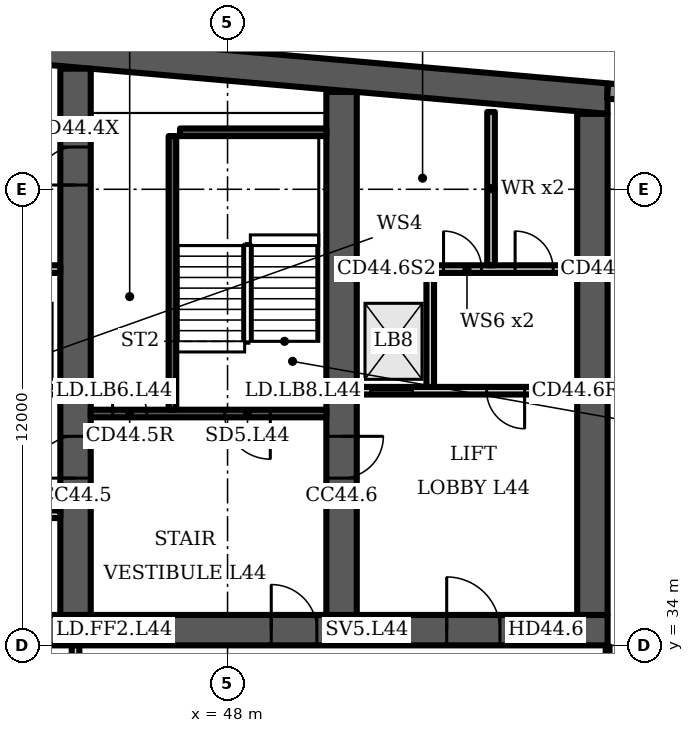
"""IFC4 building model, lengths in metres.
Left out: names, types, materials, properties, quantities, classifications, styles, units other than length and angle.
Written with IfcOpenShell. Run it as: python <this file> out.ifc"""

import sys

from ifc_helpers import new_model, si_unit, direction, frame, frame_2d, origin, place, context, subcontext, project, spatial, polyline, rectangle, outline, extrude, element, fill, save


model = new_model("IFC4")
c1 = context("Model", 3, precision=1e-05, world=origin(), true_north=direction((0.0, 1.0)))
c2 = subcontext(c1, "Body", "Model", "MODEL_VIEW")
j1 = project(units=[si_unit("LENGTHUNIT", "METRE"), si_unit("PLANEANGLEUNIT", "RADIAN")], contexts=[c1])
p1 = place(None, origin())
s1 = spatial("IfcSite", under=j1, at=p1, CompositionType="ELEMENT")
p2 = place(p1, origin())
s2 = spatial("IfcBuilding", under=s1, at=p2, CompositionType="ELEMENT")
p3 = place(p2, frame((0.0, 0.0, 180.7)))
s3 = spatial("IfcBuildingStorey", under=s2, at=p3, CompositionType="ELEMENT", Elevation=180.7)
p4 = place(p3, origin())
e1 = element("IfcWall", 1, at=p4, inside=s3, PredefinedType="SHEAR", context=c2, shape_type="SweptSolid", body=[
    extrude(outline(polyline([(16.0, 47.984), (37.0, 49.822), (58.0, 47.984), (58.0, 48.787), (37.0, 50.625), (16.0, 48.787), (16.0, 47.984)])), origin(), (0.0, 0.0, 1.0), 3.6),
])
p5 = place(p3, frame((16.0, 34.4, 0.0), z_axis=(0.0, 0.0, 1.0), x_axis=(1.0, 0.0, 0.0)))
e2 = element("IfcWall", 2, at=p5, inside=s3, PredefinedType="SHEAR", context=c2, shape_type="SweptSolid", body=[
    extrude(rectangle(XDim=42.0, YDim=0.8, at=frame_2d((21.0, 0.0))), origin(), (0.0, 0.0, 1.0), 3.6),
])
p6 = place(p5, frame((3.2, 0.0, 0.0)))
e3 = element("IfcOpeningElement", 3, at=p6, cuts=e2, PredefinedType="OPENING", context=c2, shape_type="SweptSolid", body=[
    extrude(rectangle(XDim=1.0, YDim=2.1, at=frame_2d((0.5, 1.05))), frame((0.0, 0.41, 0.0), z_axis=(0.0, -1.0, 0.0), x_axis=(1.0, 0.0, 0.0)), (0.0, 0.0, 1.0), 0.82),
])
p7 = place(p5, frame((7.65, 0.0, 0.0)))
e4 = element("IfcOpeningElement", 4, at=p7, cuts=e2, PredefinedType="OPENING", context=c2, shape_type="SweptSolid", body=[
    extrude(rectangle(XDim=1.2, YDim=2.1, at=frame_2d((0.6, 1.05))), frame((0.0, 0.41, 0.0), z_axis=(0.0, -1.0, 0.0), x_axis=(1.0, 0.0, 0.0)), (0.0, 0.0, 1.0), 0.82),
])
p8 = place(p5, frame((14.767, 0.0, 0.0)))
e5 = element("IfcOpeningElement", 5, at=p8, cuts=e2, PredefinedType="OPENING", context=c2, shape_type="SweptSolid", body=[
    extrude(rectangle(XDim=1.1, YDim=2.1, at=frame_2d((0.55, 1.05))), frame((0.0, 0.41, 0.0), z_axis=(0.0, -1.0, 0.0), x_axis=(1.0, 0.0, 0.0)), (0.0, 0.0, 1.0), 0.82),
])
p9 = place(p5, frame((19.133, 0.0, 0.0)))
e6 = element("IfcOpeningElement", 6, at=p9, cuts=e2, PredefinedType="OPENING", context=c2, shape_type="SweptSolid", body=[
    extrude(rectangle(XDim=1.1, YDim=2.1, at=frame_2d((0.55, 1.05))), frame((0.0, 0.41, 0.0), z_axis=(0.0, -1.0, 0.0), x_axis=(1.0, 0.0, 0.0)), (0.0, 0.0, 1.0), 0.82),
])
p10 = place(p5, frame((16.8, 0.0, 0.0)))
e7 = element("IfcOpeningElement", 7, at=p10, cuts=e2, PredefinedType="OPENING", context=c2, shape_type="SweptSolid", body=[
    extrude(rectangle(XDim=1.4, YDim=2.1, at=frame_2d((0.7, 1.05))), frame((0.0, 0.41, 0.0), z_axis=(0.0, -1.0, 0.0), x_axis=(1.0, 0.0, 0.0)), (0.0, 0.0, 1.0), 0.82),
])
p11 = place(p5, frame((21.767, 0.0, 0.0)))
e8 = element("IfcOpeningElement", 8, at=p11, cuts=e2, PredefinedType="OPENING", context=c2, shape_type="SweptSolid", body=[
    extrude(rectangle(XDim=1.1, YDim=2.1, at=frame_2d((0.55, 1.05))), frame((0.0, 0.41, 0.0), z_axis=(0.0, -1.0, 0.0), x_axis=(1.0, 0.0, 0.0)), (0.0, 0.0, 1.0), 0.82),
])
p12 = place(p5, frame((23.95, 0.0, 0.0)))
e9 = element("IfcOpeningElement", 9, at=p12, cuts=e2, PredefinedType="OPENING", context=c2, shape_type="SweptSolid", body=[
    extrude(rectangle(XDim=1.1, YDim=2.1, at=frame_2d((0.55, 1.05))), frame((0.0, 0.41, 0.0), z_axis=(0.0, -1.0, 0.0), x_axis=(1.0, 0.0, 0.0)), (0.0, 0.0, 1.0), 0.82),
])
p13 = place(p5, frame((26.133, 0.0, 0.0)))
e10 = element("IfcOpeningElement", 10, at=p13, cuts=e2, PredefinedType="OPENING", context=c2, shape_type="SweptSolid", body=[
    extrude(rectangle(XDim=1.1, YDim=2.1, at=frame_2d((0.55, 1.05))), frame((0.0, 0.41, 0.0), z_axis=(0.0, -1.0, 0.0), x_axis=(1.0, 0.0, 0.0)), (0.0, 0.0, 1.0), 0.82),
])
p14 = place(p5, frame((33.15, 0.0, 0.0)))
e11 = element("IfcOpeningElement", 11, at=p14, cuts=e2, PredefinedType="OPENING", context=c2, shape_type="SweptSolid", body=[
    extrude(rectangle(XDim=1.2, YDim=2.1, at=frame_2d((0.6, 1.05))), frame((0.0, 0.41, 0.0), z_axis=(0.0, -1.0, 0.0), x_axis=(1.0, 0.0, 0.0)), (0.0, 0.0, 1.0), 0.82),
])
p15 = place(p5, frame((37.767, 0.0, 0.0)))
e12 = element("IfcOpeningElement", 12, at=p15, cuts=e2, PredefinedType="OPENING", context=c2, shape_type="SweptSolid", body=[
    extrude(rectangle(XDim=1.4, YDim=2.1, at=frame_2d((0.7, 1.05))), frame((0.0, 0.41, 0.0), z_axis=(0.0, -1.0, 0.0), x_axis=(1.0, 0.0, 0.0)), (0.0, 0.0, 1.0), 0.82),
])
p16 = place(p3, frame((44.0, 34.8, 0.0), z_axis=(0.0, 0.0, 1.0), x_axis=(0.0, 1.0, 0.0)))
e13 = element("IfcWall", 13, at=p16, inside=s3, PredefinedType="SHEAR", context=c2, shape_type="SweptSolid", body=[
    extrude(rectangle(XDim=14.374, YDim=0.8, at=frame_2d((7.187, 0.0))), origin(), (0.0, 0.0, 1.0), 3.6),
])
p17 = place(p16, frame((11.312, 0.0, 0.0)))
e14 = element("IfcOpeningElement", 14, at=p17, cuts=e13, PredefinedType="OPENING", context=c2, shape_type="SweptSolid", body=[
    extrude(rectangle(XDim=1.0, YDim=2.1, at=frame_2d((0.5, 1.05))), frame((0.0, 0.41, 0.0), z_axis=(0.0, -1.0, 0.0), x_axis=(1.0, 0.0, 0.0)), (0.0, 0.0, 1.0), 0.82),
])
p18 = place(p16, frame((3.6, 0.0, 0.0)))
e15 = element("IfcOpeningElement", 15, at=p18, cuts=e13, PredefinedType="OPENING", context=c2, shape_type="SweptSolid", body=[
    extrude(rectangle(XDim=1.1, YDim=2.1, at=frame_2d((0.55, 1.05))), frame((0.0, 0.41, 0.0), z_axis=(0.0, -1.0, 0.0), x_axis=(1.0, 0.0, 0.0)), (0.0, 0.0, 1.0), 0.82),
])
p19 = place(p3, frame((51.0, 34.8, 0.0), z_axis=(0.0, 0.0, 1.0), x_axis=(0.0, 1.0, 0.0)))
e16 = element("IfcWall", 16, at=p19, inside=s3, PredefinedType="SHEAR", context=c2, shape_type="SweptSolid", body=[
    extrude(rectangle(XDim=13.762, YDim=0.8, at=frame_2d((6.881, 0.0))), origin(), (0.0, 0.0, 1.0), 3.6),
])
p20 = place(p19, frame((3.6, 0.0, 0.0)))
e17 = element("IfcOpeningElement", 17, at=p20, cuts=e16, PredefinedType="OPENING", context=c2, shape_type="SweptSolid", body=[
    extrude(rectangle(XDim=1.1, YDim=2.1, at=frame_2d((0.55, 1.05))), frame((0.0, 0.41, 0.0), z_axis=(0.0, -1.0, 0.0), x_axis=(1.0, 0.0, 0.0)), (0.0, 0.0, 1.0), 0.82),
])
p21 = place(p3, frame((57.6, 34.8, 0.0), z_axis=(0.0, 0.0, 1.0), x_axis=(0.0, 1.0, 0.0)))
e18 = element("IfcWall", 18, at=p21, inside=s3, PredefinedType="SHEAR", context=c2, shape_type="SweptSolid", body=[
    extrude(rectangle(XDim=13.184, YDim=0.8, at=frame_2d((6.592, 0.0))), origin(), (0.0, 0.0, 1.0), 3.6),
])
p22 = place(p3, frame((60.983, 48.326, 0.0), z_axis=(0.0, 0.0, 1.0), x_axis=(-0.996194, 0.087168, 0.0)))
e19 = element("IfcWall", 19, at=p22, inside=s3, PredefinedType="SOLIDWALL", context=c2, shape_type="SweptSolid", body=[
    extrude(rectangle(XDim=2.994, YDim=0.4, at=frame_2d((1.497, 0.0))), origin(), (0.0, 0.0, 1.0), 3.2),
])
p23 = place(p3, frame((37.4, 40.7, 0.0), z_axis=(0.0, 0.0, 1.0), x_axis=(1.0, 0.0, 0.0)))
e20 = element("IfcWall", 20, at=p23, inside=s3, PredefinedType="PARTITIONING", context=c2, shape_type="SweptSolid", body=[
    extrude(rectangle(XDim=6.2, YDim=0.2, at=frame_2d((3.1, 0.0))), origin(), (0.0, 0.0, 1.0), 3.2),
])
p24 = place(p23, frame((0.367, 0.0, 0.0)))
e21 = element("IfcOpeningElement", 21, at=p24, cuts=e20, PredefinedType="OPENING", context=c2, shape_type="SweptSolid", body=[
    extrude(rectangle(XDim=1.1, YDim=2.1, at=frame_2d((0.55, 1.05))), frame((0.0, 0.11, 0.0), z_axis=(0.0, -1.0, 0.0), x_axis=(1.0, 0.0, 0.0)), (0.0, 0.0, 1.0), 0.22),
])
p25 = place(p23, frame((2.55, 0.0, 0.0)))
e22 = element("IfcOpeningElement", 22, at=p25, cuts=e20, PredefinedType="OPENING", context=c2, shape_type="SweptSolid", body=[
    extrude(rectangle(XDim=1.1, YDim=2.1, at=frame_2d((0.55, 1.05))), frame((0.0, 0.11, 0.0), z_axis=(0.0, -1.0, 0.0), x_axis=(1.0, 0.0, 0.0)), (0.0, 0.0, 1.0), 0.22),
])
p26 = place(p23, frame((4.733, 0.0, 0.0)))
e23 = element("IfcOpeningElement", 23, at=p26, cuts=e20, PredefinedType="OPENING", context=c2, shape_type="SweptSolid", body=[
    extrude(rectangle(XDim=1.1, YDim=2.1, at=frame_2d((0.55, 1.05))), frame((0.0, 0.11, 0.0), z_axis=(0.0, -1.0, 0.0), x_axis=(1.0, 0.0, 0.0)), (0.0, 0.0, 1.0), 0.22),
])
p27 = place(p3, frame((0.0, 0.0, -0.0)))
e24 = element("IfcWall", 24, at=p27, inside=s3, PredefinedType="PARTITIONING", context=c2, shape_type="SweptSolid", body=[
    extrude(outline(polyline([(41.567, 37.1), (39.433, 37.1), (39.433, 34.8), (39.233, 34.8), (39.233, 37.65), (37.4, 37.65), (37.4, 37.85), (39.233, 37.85), (39.433, 37.85), (39.433, 37.3), (41.567, 37.3), (41.567, 37.55), (41.767, 37.55), (43.6, 37.55), (43.6, 37.35), (41.767, 37.35), (41.767, 34.8), (41.567, 34.8), (41.567, 37.1)])), origin(), (0.0, 0.0, 1.0), 3.2),
])
p28 = place(p3, frame((0.0, 0.0, -0.0)))
e25 = element("IfcWall", 25, at=p28, inside=s3, PredefinedType="PARTITIONING", context=c2, shape_type="SweptSolid", body=[
    extrude(outline(polyline([(39.433, 40.8), (39.233, 40.8), (39.233, 43.8), (37.4, 43.8), (37.4, 44.0), (43.6, 44.0), (43.6, 43.8), (41.767, 43.8), (41.767, 40.8), (41.567, 40.8), (41.567, 43.8), (39.433, 43.8), (39.433, 40.8)])), origin(), (0.0, 0.0, 1.0), 3.2),
])
p29 = place(p3, frame((44.4, 40.1, 0.0), z_axis=(0.0, 0.0, 1.0), x_axis=(1.0, 0.0, 0.0)))
e26 = element("IfcWall", 26, at=p29, inside=s3, PredefinedType="SHEAR", context=c2, shape_type="SweptSolid", body=[
    extrude(rectangle(XDim=6.2, YDim=0.2, at=frame_2d((3.1, 0.0))), origin(), (0.0, 0.0, 1.0), 3.2),
])
p30 = place(p29, frame((3.525, 0.0, 0.0)))
e27 = element("IfcOpeningElement", 27, at=p30, cuts=e26, PredefinedType="OPENING", context=c2, shape_type="SweptSolid", body=[
    extrude(rectangle(XDim=1.2, YDim=2.1, at=frame_2d((0.6, 1.05))), frame((0.0, 0.11, 0.0), z_axis=(0.0, -1.0, 0.0), x_axis=(1.0, 0.0, 0.0)), (0.0, 0.0, 1.0), 0.22),
])
p31 = place(p29, frame((0.575, 0.0, 0.0)))
e28 = element("IfcOpeningElement", 28, at=p31, cuts=e26, PredefinedType="OPENING", context=c2, shape_type="SweptSolid", body=[
    extrude(rectangle(XDim=0.9, YDim=2.1, at=frame_2d((0.45, 1.05))), frame((0.0, 0.11, 0.0), z_axis=(0.0, -1.0, 0.0), x_axis=(1.0, 0.0, 0.0)), (0.0, 0.0, 1.0), 0.22),
])
p32 = place(p3, frame((46.55, 40.2, 0.0), z_axis=(0.0, 0.0, 1.0), x_axis=(0.0, 1.0, 0.0)))
e29 = element("IfcWall", 29, at=p32, inside=s3, PredefinedType="SHEAR", context=c2, shape_type="SweptSolid", body=[
    extrude(rectangle(XDim=7.2, YDim=0.2, at=frame_2d((3.6, 0.0))), origin(), (0.0, 0.0, 1.0), 3.2),
])
p33 = place(p3, frame((46.75, 47.5, 0.0), z_axis=(0.0, 0.0, 1.0), x_axis=(1.0, 0.0, 0.0)))
e30 = element("IfcWall", 30, at=p33, inside=s3, PredefinedType="SHEAR", context=c2, shape_type="SweptSolid", body=[
    extrude(rectangle(XDim=3.85, YDim=0.2, at=frame_2d((1.925, 0.0))), origin(), (0.0, 0.0, 1.0), 3.2),
])
p34 = place(p3, frame((51.4, 40.7, 0.0), z_axis=(0.0, 0.0, 1.0), x_axis=(1.0, 0.0, 0.0)))
e31 = element("IfcWall", 31, at=p34, inside=s3, PredefinedType="PARTITIONING", context=c2, shape_type="SweptSolid", body=[
    extrude(rectangle(XDim=5.8, YDim=0.2, at=frame_2d((2.9, 0.0))), origin(), (0.0, 0.0, 1.0), 3.2),
])
p35 = place(p34, frame((0.367, 0.0, 0.0)))
e32 = element("IfcOpeningElement", 32, at=p35, cuts=e31, PredefinedType="OPENING", context=c2, shape_type="SweptSolid", body=[
    extrude(rectangle(XDim=1.1, YDim=2.1, at=frame_2d((0.55, 1.05))), frame((0.0, 0.11, 0.0), z_axis=(0.0, -1.0, 0.0), x_axis=(1.0, 0.0, 0.0)), (0.0, 0.0, 1.0), 0.22),
])
p36 = place(p34, frame((3.417, 0.0, 0.0)))
e33 = element("IfcOpeningElement", 33, at=p36, cuts=e31, PredefinedType="OPENING", context=c2, shape_type="SweptSolid", body=[
    extrude(rectangle(XDim=1.0, YDim=2.1, at=frame_2d((0.5, 1.05))), frame((0.0, 0.11, 0.0), z_axis=(0.0, -1.0, 0.0), x_axis=(1.0, 0.0, 0.0)), (0.0, 0.0, 1.0), 0.22),
])
p37 = place(p3, frame((51.4, 43.9, 0.0), z_axis=(0.0, 0.0, 1.0), x_axis=(1.0, 0.0, 0.0)))
e34 = element("IfcWall", 34, at=p37, inside=s3, PredefinedType="PARTITIONING", context=c2, shape_type="SweptSolid", body=[
    extrude(rectangle(XDim=5.8, YDim=0.2, at=frame_2d((2.9, 0.0))), origin(), (0.0, 0.0, 1.0), 3.2),
])
p38 = place(p37, frame((2.283, 0.0, 0.0)))
e35 = element("IfcOpeningElement", 35, at=p38, cuts=e34, PredefinedType="OPENING", context=c2, shape_type="SweptSolid", body=[
    extrude(rectangle(XDim=1.0, YDim=2.1, at=frame_2d((0.5, 1.05))), frame((0.0, 0.11, 0.0), z_axis=(0.0, -1.0, 0.0), x_axis=(1.0, 0.0, 0.0)), (0.0, 0.0, 1.0), 0.22),
])
p39 = place(p37, frame((4.167, 0.0, 0.0)))
e36 = element("IfcOpeningElement", 36, at=p39, cuts=e34, PredefinedType="OPENING", context=c2, shape_type="SweptSolid", body=[
    extrude(rectangle(XDim=1.0, YDim=2.1, at=frame_2d((0.5, 1.05))), frame((0.0, 0.11, 0.0), z_axis=(0.0, -1.0, 0.0), x_axis=(1.0, 0.0, 0.0)), (0.0, 0.0, 1.0), 0.22),
])
p40 = place(p3, frame((0.0, 0.0, -0.0)))
e37 = element("IfcWall", 37, at=p40, inside=s3, PredefinedType="PARTITIONING", context=c2, shape_type="SweptSolid", body=[
    extrude(outline(polyline([(53.433, 40.8), (53.433, 43.8), (53.233, 43.8), (53.233, 40.8), (53.433, 40.8)])), origin(), (0.0, 0.0, 1.0), 3.2),
])
p41 = place(p3, frame((54.933, 44.0, 0.0), z_axis=(0.0, 0.0, 1.0), x_axis=(0.0, 1.0, 0.0)))
e38 = element("IfcWall", 38, at=p41, inside=s3, PredefinedType="PARTITIONING", context=c2, shape_type="SweptSolid", body=[
    extrude(rectangle(XDim=4.034, YDim=0.2, at=frame_2d((2.017, 0.0))), origin(), (0.0, 0.0, 1.0), 3.2),
])
p42 = place(p3, frame((44.0, 30.5, 0.0), z_axis=(0.0, 0.0, 1.0), x_axis=(0.0, 1.0, 0.0)))
e39 = element("IfcWall", 39, at=p42, inside=s3, PredefinedType="PARTITIONING", context=c2, shape_type="SweptSolid", body=[
    extrude(rectangle(XDim=3.5, YDim=0.2, at=frame_2d((1.75, 0.0))), origin(), (0.0, 0.0, 1.0), 3.2),
])
p43 = place(p42, frame((1.2, 0.0, 0.0)))
e40 = element("IfcOpeningElement", 40, at=p43, cuts=e39, PredefinedType="OPENING", context=c2, shape_type="SweptSolid", body=[
    extrude(rectangle(XDim=1.1, YDim=2.1, at=frame_2d((0.55, 1.05))), frame((0.0, 0.11, 0.0), z_axis=(0.0, -1.0, 0.0), x_axis=(1.0, 0.0, 0.0)), (0.0, 0.0, 1.0), 0.22),
])
p44 = place(p3, frame((58.0, 31.925, 0.0), z_axis=(0.0, 0.0, 1.0), x_axis=(0.0, 1.0, 0.0)))
e41 = element("IfcWall", 41, at=p44, inside=s3, PredefinedType="PARTITIONING", context=c2, shape_type="SweptSolid", body=[
    extrude(rectangle(XDim=2.055, YDim=0.1, at=frame_2d((1.027, 0.0))), origin(), (0.0, 0.0, 1.0), 3.2),
])
p45 = place(p17, origin())
e42 = element("IfcDoor", 42, at=p45, inside=s3, OperationType="SINGLE_SWING_LEFT", PredefinedType="DOOR", context=c2, shape_type="SweptSolid", body=[
    extrude(rectangle(XDim=1.0, YDim=2.1, at=frame_2d((0.5, 1.05))), frame((0.0, 0.4, 0.0), z_axis=(0.0, -1.0, 0.0), x_axis=(1.0, 0.0, 0.0)), (0.0, 0.0, 1.0), 0.8),
])
fill(e14, e42)
p46 = place(p30, origin())
e43 = element("IfcDoor", 43, at=p46, inside=s3, OperationType="SINGLE_SWING_RIGHT", PredefinedType="DOOR", context=c2, shape_type="SweptSolid", body=[
    extrude(rectangle(XDim=1.2, YDim=2.1, at=frame_2d((0.6, 1.05))), frame((0.0, 0.025, 0.0), z_axis=(0.0, -1.0, 0.0), x_axis=(1.0, 0.0, 0.0)), (0.0, 0.0, 1.0), 0.05),
])
fill(e27, e43)
p47 = place(p31, origin())
e44 = element("IfcDoor", 44, at=p47, inside=s3, OperationType="SINGLE_SWING_LEFT", PredefinedType="DOOR", context=c2, shape_type="SweptSolid", body=[
    extrude(rectangle(XDim=0.9, YDim=2.1, at=frame_2d((0.45, 1.05))), frame((0.0, 0.025, 0.0), z_axis=(0.0, -1.0, 0.0), x_axis=(1.0, 0.0, 0.0)), (0.0, 0.0, 1.0), 0.05),
])
fill(e28, e44)
p48 = place(p14, origin())
e45 = element("IfcDoor", 45, at=p48, inside=s3, OperationType="SINGLE_SWING_LEFT", PredefinedType="DOOR", context=c2, shape_type="SweptSolid", body=[
    extrude(rectangle(XDim=1.2, YDim=2.1, at=frame_2d((0.6, 1.05))), frame((0.0, 0.025, 0.0), z_axis=(0.0, -1.0, 0.0), x_axis=(1.0, 0.0, 0.0)), (0.0, 0.0, 1.0), 0.05),
])
fill(e11, e45)
p49 = place(p15, origin())
e46 = element("IfcDoor", 46, at=p49, inside=s3, OperationType="DOUBLE_DOOR_SINGLE_SWING", PredefinedType="DOOR", context=c2, shape_type="SweptSolid", body=[
    extrude(rectangle(XDim=1.4, YDim=2.1, at=frame_2d((0.7, 1.05))), frame((0.0, 0.025, 0.0), z_axis=(0.0, -1.0, 0.0), x_axis=(1.0, 0.0, 0.0)), (0.0, 0.0, 1.0), 0.05),
])
fill(e12, e46)
p50 = place(p35, origin())
e47 = element("IfcDoor", 47, at=p50, inside=s3, OperationType="DOUBLE_DOOR_SLIDING", PredefinedType="DOOR", context=c2, shape_type="SweptSolid", body=[
    extrude(rectangle(XDim=1.1, YDim=2.1, at=frame_2d((0.55, 1.05))), frame((0.0, 0.025, 0.0), z_axis=(0.0, -1.0, 0.0), x_axis=(1.0, 0.0, 0.0)), (0.0, 0.0, 1.0), 0.05),
])
fill(e32, e47)
p51 = place(p36, origin())
e48 = element("IfcDoor", 48, at=p51, inside=s3, OperationType="SINGLE_SWING_RIGHT", PredefinedType="DOOR", context=c2, shape_type="SweptSolid", body=[
    extrude(rectangle(XDim=1.0, YDim=2.1, at=frame_2d((0.5, 1.05))), frame((0.0, 0.025, 0.0), z_axis=(0.0, -1.0, 0.0), x_axis=(1.0, 0.0, 0.0)), (0.0, 0.0, 1.0), 0.05),
])
fill(e33, e48)
p52 = place(p38, origin())
e49 = element("IfcDoor", 49, at=p52, inside=s3, OperationType="SINGLE_SWING_LEFT", PredefinedType="DOOR", context=c2, shape_type="SweptSolid", body=[
    extrude(rectangle(XDim=1.0, YDim=2.1, at=frame_2d((0.5, 1.05))), frame((0.0, 0.025, 0.0), z_axis=(0.0, -1.0, 0.0), x_axis=(1.0, 0.0, 0.0)), (0.0, 0.0, 1.0), 0.05),
])
fill(e35, e49)
p53 = place(p39, origin())
e50 = element("IfcDoor", 50, at=p53, inside=s3, OperationType="SINGLE_SWING_LEFT", PredefinedType="DOOR", context=c2, shape_type="SweptSolid", body=[
    extrude(rectangle(XDim=1.0, YDim=2.1, at=frame_2d((0.5, 1.05))), frame((0.0, 0.025, 0.0), z_axis=(0.0, -1.0, 0.0), x_axis=(1.0, 0.0, 0.0)), (0.0, 0.0, 1.0), 0.05),
])
fill(e36, e50)
p54 = place(p18, origin())
e51 = element("IfcDoor", 51, at=p54, inside=s3, OperationType="SINGLE_SWING_LEFT", PredefinedType="DOOR", context=c2, shape_type="SweptSolid", body=[
    extrude(rectangle(XDim=1.1, YDim=2.1, at=frame_2d((0.55, 1.05))), frame((0.0, 0.025, 0.0), z_axis=(0.0, -1.0, 0.0), x_axis=(1.0, 0.0, 0.0)), (0.0, 0.0, 1.0), 0.05),
])
fill(e15, e51)
p55 = place(p20, origin())
e52 = element("IfcDoor", 52, at=p55, inside=s3, OperationType="SINGLE_SWING_RIGHT", PredefinedType="DOOR", context=c2, shape_type="SweptSolid", body=[
    extrude(rectangle(XDim=1.1, YDim=2.1, at=frame_2d((0.55, 1.05))), frame((0.0, 0.025, 0.0), z_axis=(0.0, -1.0, 0.0), x_axis=(1.0, 0.0, 0.0)), (0.0, 0.0, 1.0), 0.05),
])
fill(e17, e52)
save(model, sys.argv[1])
